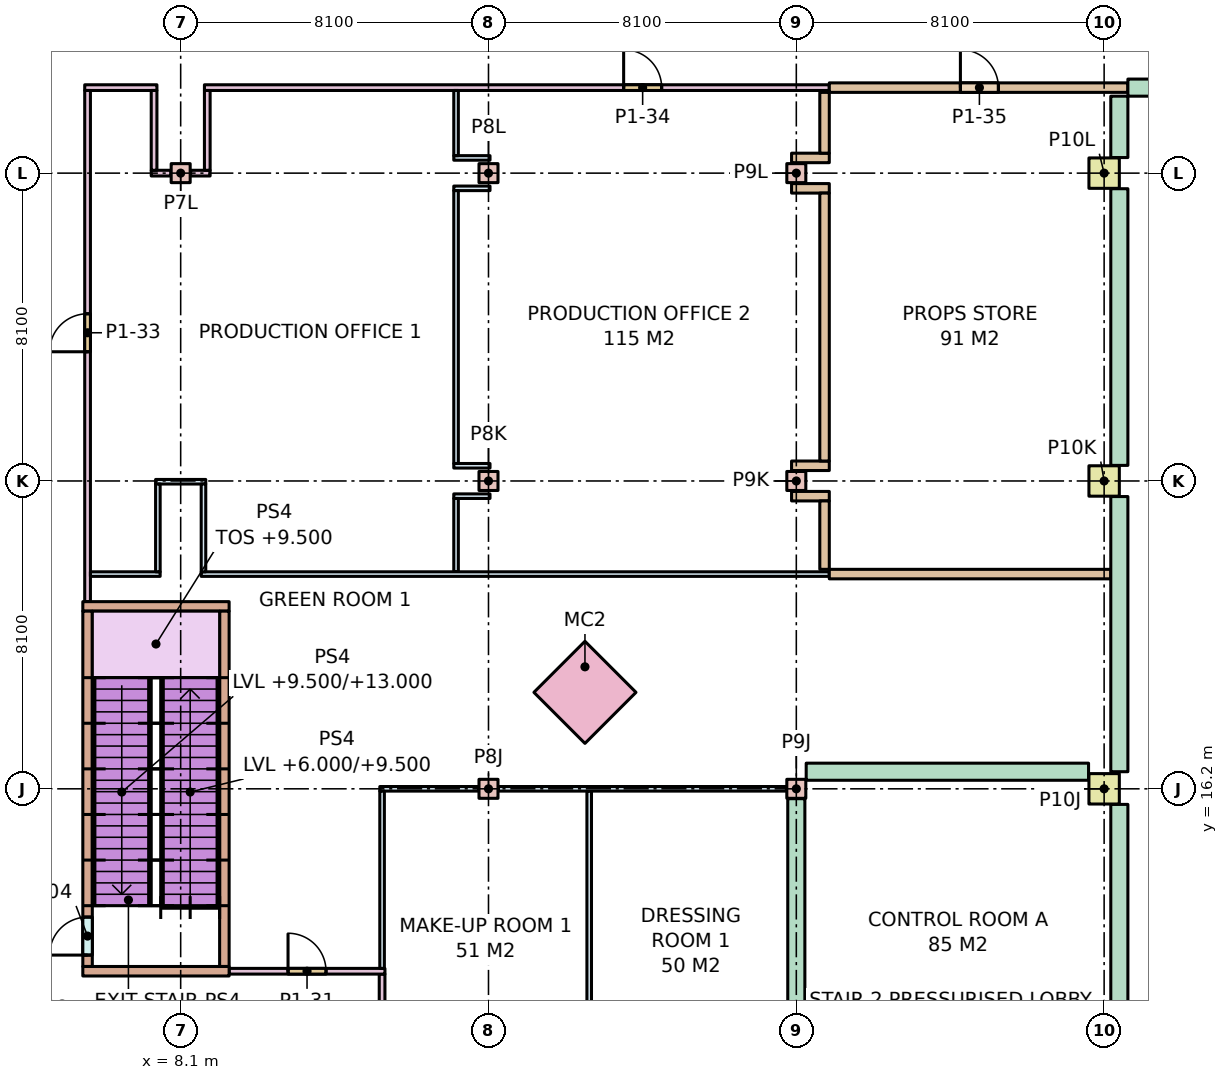
"""IFC4 building model, lengths in metres.
Left out: names, types, materials, properties, quantities, classifications, styles, units other than length and angle.
Written with IfcOpenShell. Run it as: python <this file> out.ifc"""

import sys

from ifc_helpers import new_model, si_unit, direction, frame, frame_2d, origin, origin_2d, place, context, subcontext, project, spatial, rectangle, extrude, element, fill, save


model = new_model("IFC4")
c1 = context("Model", 3, precision=1e-05, world=origin(), true_north=direction((0.0, 1.0)))
c2 = subcontext(c1, "Body", "Model", "MODEL_VIEW")
j1 = project(units=[si_unit("LENGTHUNIT", "METRE"), si_unit("PLANEANGLEUNIT", "RADIAN")], contexts=[c1])
p1 = place(None, origin())
s1 = spatial("IfcSite", under=j1, at=p1, CompositionType="ELEMENT")
p2 = place(p1, origin())
s2 = spatial("IfcBuilding", under=s1, at=p2, CompositionType="ELEMENT")
p3 = place(p2, frame((0.0, 0.0, 6.0)))
s3 = spatial("IfcBuildingStorey", under=s2, at=p3, CompositionType="ELEMENT", Elevation=6.0)
for number, where, z_axis, x_axis in (
    (1, (8.1, 32.4, 0.0), (0.0, 0.0, 1.0), (1.0, 0.0, 0.0)),
    (2, (16.2, 16.2, 0.0), (0.0, 0.0, 1.0), (1.0, 0.0, 0.0)),
    (3, (16.2, 24.3, 0.0), (0.0, 0.0, 1.0), (1.0, 0.0, 0.0)),
    (4, (16.2, 32.4, 0.0), (0.0, 0.0, 1.0), (1.0, 0.0, 0.0)),
    (5, (24.3, 16.2, 0.0), (0.0, 0.0, 1.0), (1.0, 0.0, 0.0)),
    (6, (24.3, 24.3, 0.0), (0.0, 0.0, 1.0), (1.0, 0.0, 0.0)),
    (7, (24.3, 32.4, 0.0), (0.0, 0.0, 1.0), (1.0, 0.0, 0.0)),
):
    element("IfcColumn", number, at=place(p3, frame(where, z_axis=z_axis, x_axis=x_axis)), inside=s3, PredefinedType="COLUMN", context=c2, shape_type="SweptSolid", body=[
        extrude(rectangle(XDim=0.5, YDim=0.5, at=origin_2d()), origin(), (0.0, 0.0, 1.0), 7.0),
    ])
for number, where, z_axis, x_axis in (
    (8, (32.4, 16.2, 0.0), (0.0, 0.0, 1.0), (1.0, 0.0, 0.0)),
    (9, (32.4, 24.3, 0.0), (0.0, 0.0, 1.0), (1.0, 0.0, 0.0)),
    (10, (32.4, 32.4, 0.0), (0.0, 0.0, 1.0), (1.0, 0.0, 0.0)),
):
    element("IfcColumn", number, at=place(p3, frame(where, z_axis=z_axis, x_axis=x_axis)), inside=s3, PredefinedType="COLUMN", context=c2, shape_type="SweptSolid", body=[
        extrude(rectangle(XDim=0.8, YDim=0.8, at=origin_2d()), origin(), (0.0, 0.0, 1.0), 7.0),
    ])
p4 = place(p3, frame((18.738, 18.738, 0.0), z_axis=(0.0, 0.0, 1.0), x_axis=(-0.707106781187, 0.707106781187, 0.0)))
e11 = element("IfcColumn", 11, at=p4, inside=s3, PredefinedType="COLUMN", context=c2, shape_type="SweptSolid", body=[
    extrude(rectangle(XDim=1.9, YDim=1.9, at=origin_2d()), origin(), (0.0, 0.0, 1.0), 7.0),
])
p5 = place(p3, frame((24.3, 5.875, 0.0), z_axis=(0.0, 0.0, 1.0), x_axis=(0.0, 1.0, 0.0)))
e12 = element("IfcWall", 12, at=p5, inside=s3, PredefinedType="PARTITIONING", context=c2, shape_type="SweptSolid", body=[
    extrude(rectangle(XDim=10.065, YDim=0.45, at=frame_2d((5.032, 0.0))), origin(), (0.0, 0.0, 1.0), 6.68),
])
p6 = place(p3, frame((24.56, 16.65, 0.0), z_axis=(0.0, 0.0, 1.0), x_axis=(1.0, 0.0, 0.0)))
e13 = element("IfcWall", 13, at=p6, inside=s3, PredefinedType="PARTITIONING", context=c2, shape_type="SweptSolid", body=[
    extrude(rectangle(XDim=7.43, YDim=0.45, at=frame_2d((3.715, 0.0))), origin(), (0.0, 0.0, 1.0), 6.68),
])
p7 = place(p3, frame((32.8, 8.65, 0.0), z_axis=(0.0, 0.0, 1.0), x_axis=(0.0, 1.0, 0.0)))
e14 = element("IfcWall", 14, at=p7, inside=s3, PredefinedType="PARTITIONING", context=c2, shape_type="SweptSolid", body=[
    extrude(rectangle(XDim=7.14, YDim=0.45, at=frame_2d((3.57, 0.0))), origin(), (0.0, 0.0, 1.0), 6.68),
])
p8 = place(p3, frame((18.85, 5.725, 0.0), z_axis=(0.0, 0.0, 1.0), x_axis=(0.0, 1.0, 0.0)))
e15 = element("IfcWall", 15, at=p8, inside=s3, PredefinedType="PARTITIONING", context=c2, shape_type="SweptSolid", body=[
    extrude(rectangle(XDim=10.415, YDim=0.12, at=frame_2d((5.208, 0.0))), origin(), (0.0, 0.0, 1.0), 6.68),
])
for number, where, z_axis, x_axis in (
    (16, (15.286, 23.9, 0.0), (0.0, 0.0, 1.0), (1.0, 0.0, 0.0)),
    (17, (15.286, 24.7, 0.0), (0.0, 0.0, 1.0), (1.0, 0.0, 0.0)),
    (18, (15.286, 32.0, 0.0), (0.0, 0.0, 1.0), (1.0, 0.0, 0.0)),
    (19, (15.286, 32.8, 0.0), (0.0, 0.0, 1.0), (1.0, 0.0, 0.0)),
):
    element("IfcWall", number, at=place(p3, frame(where, z_axis=z_axis, x_axis=x_axis)), inside=s3, PredefinedType="PARTITIONING", context=c2, shape_type="SweptSolid", body=[
        extrude(rectangle(XDim=0.954, YDim=0.12, at=frame_2d((0.477, 0.0))), origin(), (0.0, 0.0, 1.0), 6.68),
    ])
p9 = place(p3, frame((15.346, 21.91, 0.0), z_axis=(0.0, 0.0, 1.0), x_axis=(0.0, 1.0, 0.0)))
e20 = element("IfcWall", 20, at=p9, inside=s3, PredefinedType="PARTITIONING", context=c2, shape_type="SweptSolid", body=[
    extrude(rectangle(XDim=1.93, YDim=0.12, at=frame_2d((0.965, 0.0))), origin(), (0.0, 0.0, 1.0), 6.68),
])
p10 = place(p3, frame((15.346, 24.76, 0.0), z_axis=(0.0, 0.0, 1.0), x_axis=(0.0, 1.0, 0.0)))
e21 = element("IfcWall", 21, at=p10, inside=s3, PredefinedType="PARTITIONING", context=c2, shape_type="SweptSolid", body=[
    extrude(rectangle(XDim=7.18, YDim=0.12, at=frame_2d((3.59, 0.0))), origin(), (0.0, 0.0, 1.0), 6.68),
])
p11 = place(p3, frame((15.346, 32.86, 0.0), z_axis=(0.0, 0.0, 1.0), x_axis=(0.0, 1.0, 0.0)))
e22 = element("IfcWall", 22, at=p11, inside=s3, PredefinedType="PARTITIONING", context=c2, shape_type="SweptSolid", body=[
    extrude(rectangle(XDim=1.715, YDim=0.12, at=frame_2d((0.857, 0.0))), origin(), (0.0, 0.0, 1.0), 6.68),
])
p12 = place(p3, frame((7.325, 32.4, 0.0), z_axis=(0.0, 0.0, 1.0), x_axis=(1.0, 0.0, 0.0)))
e23 = element("IfcWall", 23, at=p12, inside=s3, PredefinedType="PARTITIONING", context=c2, shape_type="SweptSolid", body=[
    extrude(rectangle(XDim=0.515, YDim=0.15, at=frame_2d((0.258, 0.0))), origin(), (0.0, 0.0, 1.0), 6.68),
])
p13 = place(p3, frame((8.36, 32.4, 0.0), z_axis=(0.0, 0.0, 1.0), x_axis=(1.0, 0.0, 0.0)))
e24 = element("IfcWall", 24, at=p13, inside=s3, PredefinedType="PARTITIONING", context=c2, shape_type="SweptSolid", body=[
    extrude(rectangle(XDim=0.515, YDim=0.15, at=frame_2d((0.257, 0.0))), origin(), (0.0, 0.0, 1.0), 6.68),
])
p14 = place(p3, frame((5.575, 34.65, 0.0), z_axis=(0.0, 0.0, 1.0), x_axis=(1.0, 0.0, 0.0)))
e25 = element("IfcWall", 25, at=p14, inside=s3, PredefinedType="PARTITIONING", context=c2, shape_type="SweptSolid", body=[
    extrude(rectangle(XDim=1.9, YDim=0.15, at=frame_2d((0.95, 0.0))), origin(), (0.0, 0.0, 1.0), 6.68),
])
p15 = place(p3, frame((8.725, 34.65, 0.0), z_axis=(0.0, 0.0, 1.0), x_axis=(1.0, 0.0, 0.0)))
e26 = element("IfcWall", 26, at=p15, inside=s3, PredefinedType="PARTITIONING", context=c2, shape_type="SweptSolid", body=[
    extrude(rectangle(XDim=16.443, YDim=0.15, at=frame_2d((8.221, 0.0))), origin(), (0.0, 0.0, 1.0), 6.68),
])
p16 = place(p15, frame((11.031, 0.0, 0.0)))
e27 = element("IfcOpeningElement", 27, at=p16, cuts=e26, PredefinedType="OPENING", context=c2, shape_type="SweptSolid", body=[
    extrude(rectangle(XDim=1.0, YDim=2.1, at=frame_2d((0.5, 1.05))), frame((0.0, 0.085, 0.0), z_axis=(0.0, -1.0, 0.0), x_axis=(1.0, 0.0, 0.0)), (0.0, 0.0, 1.0), 0.17),
])
for number, where, z_axis, x_axis in (
    (28, (7.4, 32.475, 0.0), (0.0, 0.0, 1.0), (0.0, 1.0, 0.0)),
    (29, (8.8, 32.475, 0.0), (0.0, 0.0, 1.0), (0.0, 1.0, 0.0)),
):
    element("IfcWall", number, at=place(p3, frame(where, z_axis=z_axis, x_axis=x_axis)), inside=s3, PredefinedType="PARTITIONING", context=c2, shape_type="SweptSolid", body=[
        extrude(rectangle(XDim=2.1, YDim=0.15, at=frame_2d((1.05, 0.0))), origin(), (0.0, 0.0, 1.0), 6.68),
    ])
p17 = place(p3, frame((5.725, 21.85, 0.0), z_axis=(0.0, 0.0, 1.0), x_axis=(1.0, 0.0, 0.0)))
e30 = element("IfcWall", 30, at=p17, inside=s3, PredefinedType="PARTITIONING", context=c2, shape_type="SweptSolid", body=[
    extrude(rectangle(XDim=1.835, YDim=0.12, at=frame_2d((0.917, 0.0))), origin(), (0.0, 0.0, 1.0), 6.68),
])
p18 = place(p3, frame((8.64, 21.85, 0.0), z_axis=(0.0, 0.0, 1.0), x_axis=(1.0, 0.0, 0.0)))
e31 = element("IfcWall", 31, at=p18, inside=s3, PredefinedType="PARTITIONING", context=c2, shape_type="SweptSolid", body=[
    extrude(rectangle(XDim=16.528, YDim=0.12, at=frame_2d((8.264, 0.0))), origin(), (0.0, 0.0, 1.0), 6.68),
])
p19 = place(p3, frame((7.44, 24.28, 0.0), z_axis=(0.0, 0.0, 1.0), x_axis=(1.0, 0.0, 0.0)))
e32 = element("IfcWall", 32, at=p19, inside=s3, PredefinedType="PARTITIONING", context=c2, shape_type="SweptSolid", body=[
    extrude(rectangle(XDim=1.32, YDim=0.12, at=frame_2d((0.66, 0.0))), origin(), (0.0, 0.0, 1.0), 6.68),
])
for number, where, z_axis, x_axis in (
    (33, (7.5, 21.91, 0.0), (0.0, 0.0, 1.0), (0.0, 1.0, 0.0)),
    (34, (8.7, 21.91, 0.0), (0.0, 0.0, 1.0), (0.0, 1.0, 0.0)),
):
    element("IfcWall", number, at=place(p3, frame(where, z_axis=z_axis, x_axis=x_axis)), inside=s3, PredefinedType="PARTITIONING", context=c2, shape_type="SweptSolid", body=[
        extrude(rectangle(XDim=2.31, YDim=0.12, at=frame_2d((1.155, 0.0))), origin(), (0.0, 0.0, 1.0), 6.68),
    ])
for number, where, z_axis, x_axis in (
    (35, (24.175, 23.9, 0.0), (0.0, 0.0, 1.0), (1.0, 0.0, 0.0)),
    (36, (24.175, 24.7, 0.0), (0.0, 0.0, 1.0), (1.0, 0.0, 0.0)),
    (37, (24.175, 32.0, 0.0), (0.0, 0.0, 1.0), (1.0, 0.0, 0.0)),
    (38, (24.175, 32.8, 0.0), (0.0, 0.0, 1.0), (1.0, 0.0, 0.0)),
):
    element("IfcWall", number, at=place(p3, frame(where, z_axis=z_axis, x_axis=x_axis)), inside=s3, PredefinedType="PARTITIONING", context=c2, shape_type="SweptSolid", body=[
        extrude(rectangle(XDim=0.993, YDim=0.25, at=frame_2d((0.497, 0.0))), origin(), (0.0, 0.0, 1.0), 6.68),
    ])
p20 = place(p3, frame((25.043, 21.975, 0.0), z_axis=(0.0, 0.0, 1.0), x_axis=(0.0, 1.0, 0.0)))
e39 = element("IfcWall", 39, at=p20, inside=s3, PredefinedType="PARTITIONING", context=c2, shape_type="SweptSolid", body=[
    extrude(rectangle(XDim=1.8, YDim=0.25, at=frame_2d((0.9, 0.0))), origin(), (0.0, 0.0, 1.0), 6.68),
])
p21 = place(p3, frame((25.043, 24.825, 0.0), z_axis=(0.0, 0.0, 1.0), x_axis=(0.0, 1.0, 0.0)))
e40 = element("IfcWall", 40, at=p21, inside=s3, PredefinedType="PARTITIONING", context=c2, shape_type="SweptSolid", body=[
    extrude(rectangle(XDim=7.05, YDim=0.25, at=frame_2d((3.525, 0.0))), origin(), (0.0, 0.0, 1.0), 6.68),
])
p22 = place(p3, frame((25.043, 32.925, 0.0), z_axis=(0.0, 0.0, 1.0), x_axis=(0.0, 1.0, 0.0)))
e41 = element("IfcWall", 41, at=p22, inside=s3, PredefinedType="PARTITIONING", context=c2, shape_type="SweptSolid", body=[
    extrude(rectangle(XDim=1.6, YDim=0.25, at=frame_2d((0.8, 0.0))), origin(), (0.0, 0.0, 1.0), 6.68),
])
p23 = place(p3, frame((13.34, 16.2, 0.0), z_axis=(0.0, 0.0, 1.0), x_axis=(1.0, 0.0, 0.0)))
e42 = element("IfcWall", 42, at=p23, inside=s3, PredefinedType="PARTITIONING", context=c2, shape_type="SweptSolid", body=[
    extrude(rectangle(XDim=2.6, YDim=0.12, at=frame_2d((1.3, 0.0))), origin(), (0.0, 0.0, 1.0), 6.68),
])
p24 = place(p3, frame((16.46, 16.2, 0.0), z_axis=(0.0, 0.0, 1.0), x_axis=(1.0, 0.0, 0.0)))
e43 = element("IfcWall", 43, at=p24, inside=s3, PredefinedType="PARTITIONING", context=c2, shape_type="SweptSolid", body=[
    extrude(rectangle(XDim=7.58, YDim=0.12, at=frame_2d((3.79, 0.0))), origin(), (0.0, 0.0, 1.0), 6.68),
])
p25 = place(p3, frame((13.4, 11.475, 0.0), z_axis=(0.0, 0.0, 1.0), x_axis=(0.0, 1.0, 0.0)))
e44 = element("IfcWall", 44, at=p25, inside=s3, PredefinedType="PARTITIONING", context=c2, shape_type="SweptSolid", body=[
    extrude(rectangle(XDim=4.665, YDim=0.12, at=frame_2d((2.333, 0.0))), origin(), (0.0, 0.0, 1.0), 6.68),
])
p26 = place(p3, frame((13.4, 5.725, 0.0), z_axis=(0.0, 0.0, 1.0), x_axis=(0.0, 1.0, 0.0)))
e45 = element("IfcWall", 45, at=p26, inside=s3, PredefinedType="PARTITIONING", context=c2, shape_type="SweptSolid", body=[
    extrude(rectangle(XDim=5.6, YDim=0.15, at=frame_2d((2.8, 0.0))), origin(), (0.0, 0.0, 1.0), 6.68),
])
p27 = place(p3, frame((25.168, 34.65, 0.0), z_axis=(0.0, 0.0, 1.0), x_axis=(1.0, 0.0, 0.0)))
e46 = element("IfcWall", 46, at=p27, inside=s3, PredefinedType="PARTITIONING", context=c2, shape_type="SweptSolid", body=[
    extrude(rectangle(XDim=7.857, YDim=0.25, at=frame_2d((3.928, 0.0))), origin(), (0.0, 0.0, 1.0), 6.68),
])
p28 = place(p27, frame((3.45, 0.0, 0.0)))
e47 = element("IfcOpeningElement", 47, at=p28, cuts=e46, PredefinedType="OPENING", context=c2, shape_type="SweptSolid", body=[
    extrude(rectangle(XDim=1.0, YDim=2.1, at=frame_2d((0.5, 1.05))), frame((0.0, 0.135, 0.0), z_axis=(0.0, -1.0, 0.0), x_axis=(1.0, 0.0, 0.0)), (0.0, 0.0, 1.0), 0.27),
])
p29 = place(p3, frame((33.025, 34.65, 0.0), z_axis=(0.0, 0.0, 1.0), x_axis=(1.0, 0.0, 0.0)))
e48 = element("IfcWall", 48, at=p29, inside=s3, PredefinedType="PARTITIONING", context=c2, shape_type="SweptSolid", body=[
    extrude(rectangle(XDim=11.8, YDim=0.45, at=frame_2d((5.9, 0.0))), origin(), (0.0, 0.0, 1.0), 6.68),
])
p30 = place(p3, frame((5.65, 21.125, 0.0), z_axis=(0.0, 0.0, 1.0), x_axis=(0.0, 1.0, 0.0)))
e49 = element("IfcWall", 49, at=p30, inside=s3, PredefinedType="PARTITIONING", context=c2, shape_type="SweptSolid", body=[
    extrude(rectangle(XDim=13.45, YDim=0.15, at=frame_2d((6.725, 0.0))), origin(), (0.0, 0.0, 1.0), 6.68),
])
p31 = place(p30, frame((6.575, 0.0, 0.0)))
e50 = element("IfcOpeningElement", 50, at=p31, cuts=e49, PredefinedType="OPENING", context=c2, shape_type="SweptSolid", body=[
    extrude(rectangle(XDim=1.0, YDim=2.1, at=frame_2d((0.5, 1.05))), frame((0.0, 0.085, 0.0), z_axis=(0.0, -1.0, 0.0), x_axis=(1.0, 0.0, 0.0)), (0.0, 0.0, 1.0), 0.17),
])
p32 = place(p3, frame((25.168, 21.85, 0.0), z_axis=(0.0, 0.0, 1.0), x_axis=(1.0, 0.0, 0.0)))
e51 = element("IfcWall", 51, at=p32, inside=s3, PredefinedType="PARTITIONING", context=c2, shape_type="SweptSolid", body=[
    extrude(rectangle(XDim=7.407, YDim=0.25, at=frame_2d((3.704, 0.0))), origin(), (0.0, 0.0, 1.0), 6.68),
])
p33 = place(p3, frame((5.525, 21.0, 0.0), z_axis=(0.0, 0.0, 1.0), x_axis=(1.0, 0.0, 0.0)))
e52 = element("IfcWall", 52, at=p33, inside=s3, PredefinedType="STANDARD", context=c2, shape_type="SweptSolid", body=[
    extrude(rectangle(XDim=3.85, YDim=0.25, at=frame_2d((1.925, 0.0))), origin(), (0.0, 0.0, 1.0), 6.68),
])
p34 = place(p3, frame((9.25, 11.525, 0.0), z_axis=(0.0, 0.0, 1.0), x_axis=(0.0, 1.0, 0.0)))
e53 = element("IfcWall", 53, at=p34, inside=s3, PredefinedType="STANDARD", context=c2, shape_type="SweptSolid", body=[
    extrude(rectangle(XDim=9.35, YDim=0.25, at=frame_2d((4.675, 0.0))), origin(), (0.0, 0.0, 1.0), 6.68),
])
p35 = place(p3, frame((9.375, 11.4, 0.0), z_axis=(0.0, 0.0, 1.0), x_axis=(1.0, 0.0, 0.0)))
e54 = element("IfcWall", 54, at=p35, inside=s3, PredefinedType="PARTITIONING", context=c2, shape_type="SweptSolid", body=[
    extrude(rectangle(XDim=4.1, YDim=0.15, at=frame_2d((2.05, 0.0))), origin(), (0.0, 0.0, 1.0), 6.68),
])
p36 = place(p35, frame((1.55, 0.0, 0.0)))
e55 = element("IfcOpeningElement", 55, at=p36, cuts=e54, PredefinedType="OPENING", context=c2, shape_type="SweptSolid", body=[
    extrude(rectangle(XDim=1.0, YDim=2.1, at=frame_2d((0.5, 1.05))), frame((0.0, 0.085, 0.0), z_axis=(0.0, -1.0, 0.0), x_axis=(1.0, 0.0, 0.0)), (0.0, 0.0, 1.0), 0.17),
])
p37 = place(p3, frame((32.8, 16.65, 0.0), z_axis=(0.0, 0.0, 1.0), x_axis=(0.0, 1.0, 0.0)))
e56 = element("IfcWall", 56, at=p37, inside=s3, PredefinedType="PARTITIONING", context=c2, shape_type="SweptSolid", body=[
    extrude(rectangle(XDim=7.24, YDim=0.45, at=frame_2d((3.62, 0.0))), origin(), (0.0, 0.0, 1.0), 6.68),
])
p38 = place(p3, frame((5.65, 11.525, 0.0), z_axis=(0.0, 0.0, 1.0), x_axis=(0.0, 1.0, 0.0)))
e57 = element("IfcWall", 57, at=p38, inside=s3, PredefinedType="STANDARD", context=c2, shape_type="SweptSolid", body=[
    extrude(rectangle(XDim=9.35, YDim=0.25, at=frame_2d((4.675, 0.0))), origin(), (0.0, 0.0, 1.0), 6.68),
])
p39 = place(p38, frame((0.3, 0.0, 0.0)))
e58 = element("IfcOpeningElement", 58, at=p39, cuts=e57, PredefinedType="OPENING", context=c2, shape_type="SweptSolid", body=[
    extrude(rectangle(XDim=1.0, YDim=2.1, at=frame_2d((0.5, 1.05))), frame((0.0, 0.135, 0.0), z_axis=(0.0, -1.0, 0.0), x_axis=(1.0, 0.0, 0.0)), (0.0, 0.0, 1.0), 0.27),
])
p40 = place(p3, frame((32.8, 24.71, 0.0), z_axis=(0.0, 0.0, 1.0), x_axis=(0.0, 1.0, 0.0)))
e59 = element("IfcWall", 59, at=p40, inside=s3, PredefinedType="PARTITIONING", context=c2, shape_type="SweptSolid", body=[
    extrude(rectangle(XDim=7.28, YDim=0.45, at=frame_2d((3.64, 0.0))), origin(), (0.0, 0.0, 1.0), 6.68),
])
p41 = place(p3, frame((32.8, 32.81, 0.0), z_axis=(0.0, 0.0, 1.0), x_axis=(0.0, 1.0, 0.0)))
e60 = element("IfcWall", 60, at=p41, inside=s3, PredefinedType="PARTITIONING", context=c2, shape_type="SweptSolid", body=[
    extrude(rectangle(XDim=1.615, YDim=0.45, at=frame_2d((0.808, 0.0))), origin(), (0.0, 0.0, 1.0), 6.68),
])
p42 = place(p3, frame((5.525, 11.4, 0.0), z_axis=(0.0, 0.0, 1.0), x_axis=(1.0, 0.0, 0.0)))
e61 = element("IfcWall", 61, at=p42, inside=s3, PredefinedType="STANDARD", context=c2, shape_type="SweptSolid", body=[
    extrude(rectangle(XDim=3.85, YDim=0.25, at=frame_2d((1.925, 0.0))), origin(), (0.0, 0.0, 1.0), 6.68),
])
p43 = place(p39, origin())
e62 = element("IfcDoor", 62, at=p43, inside=s3, OperationType="SINGLE_SWING_LEFT", PredefinedType="DOOR", context=c2, shape_type="SweptSolid", body=[
    extrude(rectangle(XDim=1.0, YDim=2.1, at=frame_2d((0.5, 1.05))), frame((0.0, 0.025, 0.0), z_axis=(0.0, -1.0, 0.0), x_axis=(1.0, 0.0, 0.0)), (0.0, 0.0, 1.0), 0.05),
])
fill(e58, e62)
p44 = place(p36, origin())
e63 = element("IfcDoor", 63, at=p44, inside=s3, OperationType="SINGLE_SWING_LEFT", PredefinedType="DOOR", context=c2, shape_type="SweptSolid", body=[
    extrude(rectangle(XDim=1.0, YDim=2.1, at=frame_2d((0.5, 1.05))), frame((0.0, 0.025, 0.0), z_axis=(0.0, -1.0, 0.0), x_axis=(1.0, 0.0, 0.0)), (0.0, 0.0, 1.0), 0.05),
])
fill(e55, e63)
p45 = place(p31, origin())
e64 = element("IfcDoor", 64, at=p45, inside=s3, OperationType="SINGLE_SWING_LEFT", PredefinedType="DOOR", context=c2, shape_type="SweptSolid", body=[
    extrude(rectangle(XDim=1.0, YDim=2.1, at=frame_2d((0.5, 1.05))), frame((0.0, 0.025, 0.0), z_axis=(0.0, -1.0, 0.0), x_axis=(1.0, 0.0, 0.0)), (0.0, 0.0, 1.0), 0.05),
])
fill(e50, e64)
p46 = place(p16, origin())
e65 = element("IfcDoor", 65, at=p46, inside=s3, OperationType="SINGLE_SWING_LEFT", PredefinedType="DOOR", context=c2, shape_type="SweptSolid", body=[
    extrude(rectangle(XDim=1.0, YDim=2.1, at=frame_2d((0.5, 1.05))), frame((0.0, 0.025, 0.0), z_axis=(0.0, -1.0, 0.0), x_axis=(1.0, 0.0, 0.0)), (0.0, 0.0, 1.0), 0.05),
])
fill(e27, e65)
p47 = place(p28, origin())
e66 = element("IfcDoor", 66, at=p47, inside=s3, OperationType="SINGLE_SWING_LEFT", PredefinedType="DOOR", context=c2, shape_type="SweptSolid", body=[
    extrude(rectangle(XDim=1.0, YDim=2.1, at=frame_2d((0.5, 1.05))), frame((0.0, 0.025, 0.0), z_axis=(0.0, -1.0, 0.0), x_axis=(1.0, 0.0, 0.0)), (0.0, 0.0, 1.0), 0.05),
])
fill(e47, e66)
save(model, sys.argv[1])
